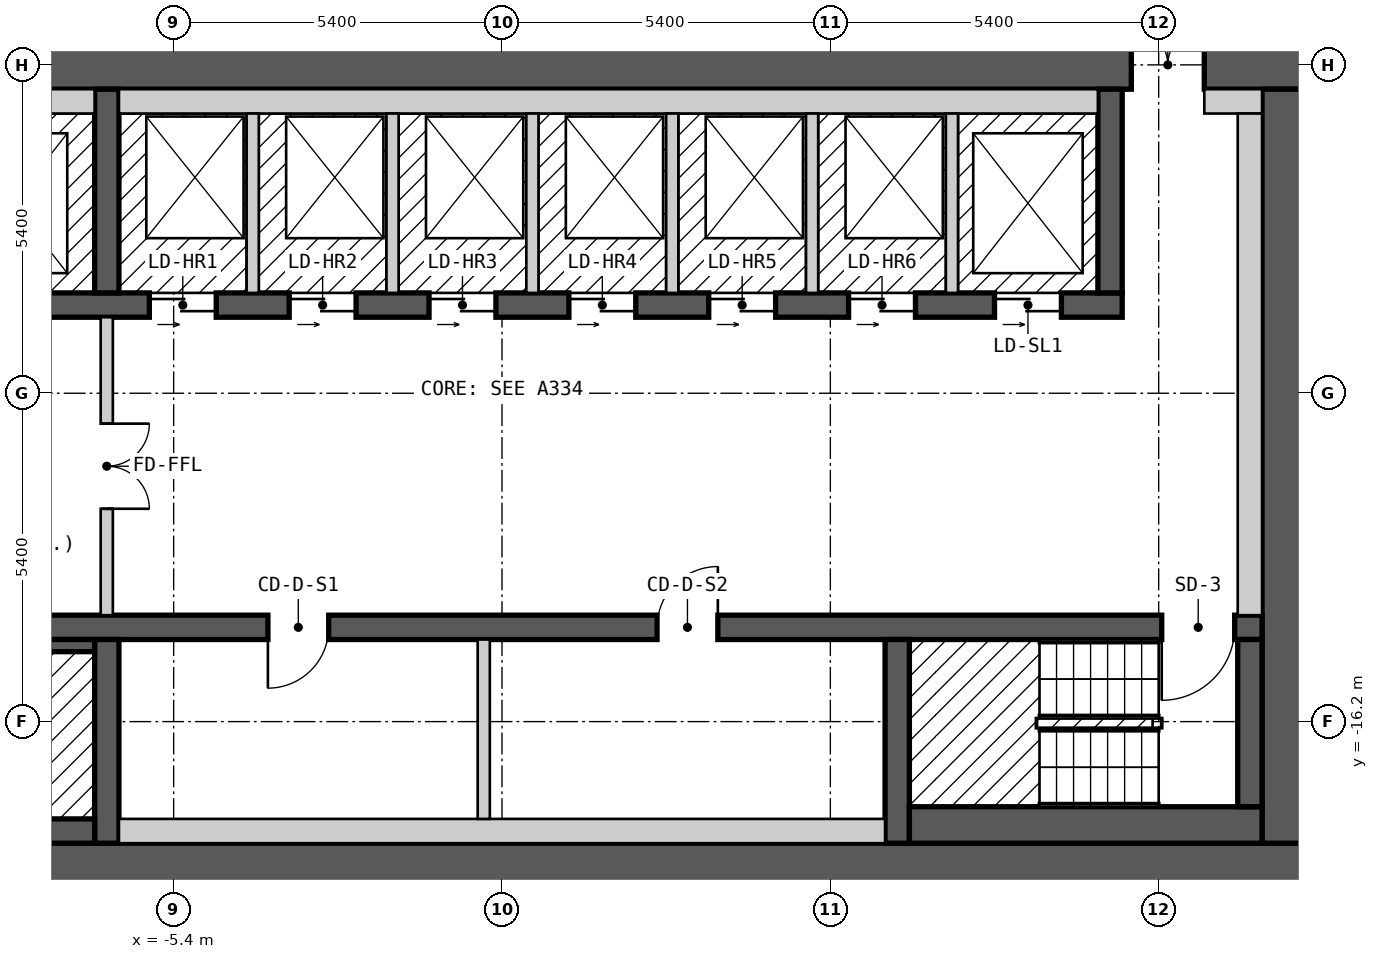
"""IFC4 building model, lengths in metres.
Left out: names, types, materials, properties, quantities, classifications, styles, units other than length and angle.
Written with IfcOpenShell. Run it as: python <this file> out.ifc"""

import sys

from ifc_helpers import new_model, si_unit, direction, frame, frame_2d, origin, place, context, subcontext, project, spatial, rectangle, extrude, element, fill, save


model = new_model("IFC4")
c1 = context("Model", 3, precision=1e-05, world=origin(), true_north=direction((0.0, 1.0)))
c2 = subcontext(c1, "Body", "Model", "MODEL_VIEW")
j1 = project(units=[si_unit("LENGTHUNIT", "METRE"), si_unit("PLANEANGLEUNIT", "RADIAN")], contexts=[c1])
p1 = place(None, origin())
s1 = spatial("IfcSite", under=j1, at=p1, CompositionType="ELEMENT")
p2 = place(p1, origin())
s2 = spatial("IfcBuilding", under=s1, at=p2, CompositionType="ELEMENT")
p3 = place(p2, frame((0.0, 0.0, 120.6)))
s3 = spatial("IfcBuildingStorey", under=s2, at=p3, CompositionType="ELEMENT", Elevation=120.6)
p4 = place(p3, frame((-13.3, -18.6, 0.0), z_axis=(0.0, 0.0, 1.0), x_axis=(1.0, 0.0, 0.0)))
e1 = element("IfcWall", 1, at=p4, inside=s3, PredefinedType="SHEAR", context=c2, shape_type="SweptSolid", body=[
    extrude(rectangle(XDim=26.6, YDim=0.8, at=frame_2d((13.3, 0.0))), origin(), (0.0, 0.0, 1.0), 2.7),
])
p5 = place(p3, frame((-13.3, -5.4, 0.0), z_axis=(0.0, 0.0, 1.0), x_axis=(1.0, 0.0, 0.0)))
e2 = element("IfcWall", 2, at=p5, inside=s3, PredefinedType="SHEAR", context=c2, shape_type="SweptSolid", body=[
    extrude(rectangle(XDim=26.6, YDim=0.8, at=frame_2d((13.3, 0.0))), origin(), (0.0, 0.0, 1.0), 2.7),
])
p6 = place(p5, frame((23.65, 0.0, 0.0)))
e3 = element("IfcOpeningElement", 3, at=p6, cuts=e2, PredefinedType="OPENING", context=c2, shape_type="SweptSolid", body=[
    extrude(rectangle(XDim=1.2, YDim=2.1, at=frame_2d((0.6, 1.05))), frame((0.0, 0.41, 0.0), z_axis=(0.0, -1.0, 0.0), x_axis=(1.0, 0.0, 0.0)), (0.0, 0.0, 1.0), 0.82),
])
p7 = place(p3, frame((12.9, -18.2, 0.0), z_axis=(0.0, 0.0, 1.0), x_axis=(0.0, 1.0, 0.0)))
e4 = element("IfcWall", 4, at=p7, inside=s3, PredefinedType="SHEAR", context=c2, shape_type="SweptSolid", body=[
    extrude(rectangle(XDim=12.4, YDim=0.8, at=frame_2d((6.2, 0.0))), origin(), (0.0, 0.0, 1.0), 2.7),
])
p8 = place(p3, frame((-12.5, -14.65, 0.0), z_axis=(0.0, 0.0, 1.0), x_axis=(1.0, 0.0, 0.0)))
e5 = element("IfcWall", 5, at=p8, inside=s3, PredefinedType="SHEAR", context=c2, shape_type="SweptSolid", body=[
    extrude(rectangle(XDim=25.0, YDim=0.4, at=frame_2d((12.5, 0.0))), origin(), (0.0, 0.0, 1.0), 2.7),
])
p9 = place(p8, frame((1.7, 0.0, 0.0), z_axis=(0.0, 0.0, 1.0), x_axis=(-1.0, 0.0, 0.0)))
e6 = element("IfcOpeningElement", 6, at=p9, cuts=e5, PredefinedType="OPENING", context=c2, shape_type="SweptSolid", body=[
    extrude(rectangle(XDim=1.2, YDim=2.1, at=frame_2d((0.6, 1.05))), frame((0.0, 0.21, 0.0), z_axis=(0.0, -1.0, 0.0), x_axis=(1.0, 0.0, 0.0)), (0.0, 0.0, 1.0), 0.42),
])
p10 = place(p8, frame((24.55, 0.0, 0.0), z_axis=(0.0, 0.0, 1.0), x_axis=(-1.0, 0.0, 0.0)))
e7 = element("IfcOpeningElement", 7, at=p10, cuts=e5, PredefinedType="OPENING", context=c2, shape_type="SweptSolid", body=[
    extrude(rectangle(XDim=1.2, YDim=2.1, at=frame_2d((0.6, 1.05))), frame((0.0, 0.21, 0.0), z_axis=(0.0, -1.0, 0.0), x_axis=(1.0, 0.0, 0.0)), (0.0, 0.0, 1.0), 0.42),
])
p11 = place(p8, frame((9.65, 0.0, 0.0), z_axis=(0.0, 0.0, 1.0), x_axis=(-1.0, 0.0, 0.0)))
e8 = element("IfcOpeningElement", 8, at=p11, cuts=e5, PredefinedType="OPENING", context=c2, shape_type="SweptSolid", body=[
    extrude(rectangle(XDim=1.0, YDim=2.1, at=frame_2d((0.5, 1.05))), frame((0.0, 0.21, 0.0), z_axis=(0.0, -1.0, 0.0), x_axis=(1.0, 0.0, 0.0)), (0.0, 0.0, 1.0), 0.42),
])
p12 = place(p8, frame((16.05, 0.0, 0.0), z_axis=(0.0, 0.0, 1.0), x_axis=(-1.0, 0.0, 0.0)))
e9 = element("IfcOpeningElement", 9, at=p12, cuts=e5, PredefinedType="OPENING", context=c2, shape_type="SweptSolid", body=[
    extrude(rectangle(XDim=1.0, YDim=2.1, at=frame_2d((0.5, 1.05))), frame((0.0, 0.21, 0.0), z_axis=(0.0, -1.0, 0.0), x_axis=(1.0, 0.0, 0.0)), (0.0, 0.0, 1.0), 0.42),
])
p13 = place(p3, frame((-12.5, -9.35, 0.0), z_axis=(0.0, 0.0, 1.0), x_axis=(1.0, 0.0, 0.0)))
e10 = element("IfcWall", 10, at=p13, inside=s3, PredefinedType="SHEAR", context=c2, shape_type="SweptSolid", body=[
    extrude(rectangle(XDim=22.7, YDim=0.4, at=frame_2d((11.35, 0.0))), origin(), (0.0, 0.0, 1.0), 2.7),
])
p14 = place(p13, frame((1.1, 0.0, 0.0)))
e11 = element("IfcOpeningElement", 11, at=p14, cuts=e10, PredefinedType="OPENING", context=c2, shape_type="SweptSolid", body=[
    extrude(rectangle(XDim=1.1, YDim=2.1, at=frame_2d((0.55, 1.05))), frame((0.0, 0.21, 0.0), z_axis=(0.0, -1.0, 0.0), x_axis=(1.0, 0.0, 0.0)), (0.0, 0.0, 1.0), 0.42),
])
p15 = place(p13, frame((3.9, 0.0, 0.0)))
e12 = element("IfcOpeningElement", 12, at=p15, cuts=e10, PredefinedType="OPENING", context=c2, shape_type="SweptSolid", body=[
    extrude(rectangle(XDim=1.1, YDim=2.1, at=frame_2d((0.55, 1.05))), frame((0.0, 0.21, 0.0), z_axis=(0.0, -1.0, 0.0), x_axis=(1.0, 0.0, 0.0)), (0.0, 0.0, 1.0), 0.42),
])
p16 = place(p13, frame((6.7, 0.0, 0.0)))
e13 = element("IfcOpeningElement", 13, at=p16, cuts=e10, PredefinedType="OPENING", context=c2, shape_type="SweptSolid", body=[
    extrude(rectangle(XDim=1.1, YDim=2.1, at=frame_2d((0.55, 1.05))), frame((0.0, 0.21, 0.0), z_axis=(0.0, -1.0, 0.0), x_axis=(1.0, 0.0, 0.0)), (0.0, 0.0, 1.0), 0.42),
])
p17 = place(p13, frame((9.0, 0.0, 0.0)))
e14 = element("IfcOpeningElement", 14, at=p17, cuts=e10, PredefinedType="OPENING", context=c2, shape_type="SweptSolid", body=[
    extrude(rectangle(XDim=1.1, YDim=2.1, at=frame_2d((0.55, 1.05))), frame((0.0, 0.21, 0.0), z_axis=(0.0, -1.0, 0.0), x_axis=(1.0, 0.0, 0.0)), (0.0, 0.0, 1.0), 0.42),
])
p18 = place(p13, frame((11.3, 0.0, 0.0)))
e15 = element("IfcOpeningElement", 15, at=p18, cuts=e10, PredefinedType="OPENING", context=c2, shape_type="SweptSolid", body=[
    extrude(rectangle(XDim=1.1, YDim=2.1, at=frame_2d((0.55, 1.05))), frame((0.0, 0.21, 0.0), z_axis=(0.0, -1.0, 0.0), x_axis=(1.0, 0.0, 0.0)), (0.0, 0.0, 1.0), 0.42),
])
p19 = place(p13, frame((13.6, 0.0, 0.0)))
e16 = element("IfcOpeningElement", 16, at=p19, cuts=e10, PredefinedType="OPENING", context=c2, shape_type="SweptSolid", body=[
    extrude(rectangle(XDim=1.1, YDim=2.1, at=frame_2d((0.55, 1.05))), frame((0.0, 0.21, 0.0), z_axis=(0.0, -1.0, 0.0), x_axis=(1.0, 0.0, 0.0)), (0.0, 0.0, 1.0), 0.42),
])
p20 = place(p13, frame((15.9, 0.0, 0.0)))
e17 = element("IfcOpeningElement", 17, at=p20, cuts=e10, PredefinedType="OPENING", context=c2, shape_type="SweptSolid", body=[
    extrude(rectangle(XDim=1.1, YDim=2.1, at=frame_2d((0.55, 1.05))), frame((0.0, 0.21, 0.0), z_axis=(0.0, -1.0, 0.0), x_axis=(1.0, 0.0, 0.0)), (0.0, 0.0, 1.0), 0.42),
])
p21 = place(p13, frame((18.2, 0.0, 0.0)))
e18 = element("IfcOpeningElement", 18, at=p21, cuts=e10, PredefinedType="OPENING", context=c2, shape_type="SweptSolid", body=[
    extrude(rectangle(XDim=1.1, YDim=2.1, at=frame_2d((0.55, 1.05))), frame((0.0, 0.21, 0.0), z_axis=(0.0, -1.0, 0.0), x_axis=(1.0, 0.0, 0.0)), (0.0, 0.0, 1.0), 0.42),
])
p22 = place(p13, frame((20.6, 0.0, 0.0)))
e19 = element("IfcOpeningElement", 19, at=p22, cuts=e10, PredefinedType="OPENING", context=c2, shape_type="SweptSolid", body=[
    extrude(rectangle(XDim=1.1, YDim=2.1, at=frame_2d((0.55, 1.05))), frame((0.0, 0.21, 0.0), z_axis=(0.0, -1.0, 0.0), x_axis=(1.0, 0.0, 0.0)), (0.0, 0.0, 1.0), 0.42),
])
for number, where, z_axis, x_axis in (
    (20, (-6.5, -18.2, 0.0), (0.0, 0.0, 1.0), (0.0, 1.0, 0.0)),
    (21, (6.5, -18.2, 0.0), (0.0, 0.0, 1.0), (0.0, 1.0, 0.0)),
    (22, (-6.5, -9.15, 0.0), (0.0, 0.0, 1.0), (0.0, 1.0, 0.0)),
    (23, (10.0, -9.15, 0.0), (0.0, 0.0, 1.0), (0.0, 1.0, 0.0)),
):
    element("IfcWall", number, at=place(p3, frame(where, z_axis=z_axis, x_axis=x_axis)), inside=s3, PredefinedType="SHEAR", context=c2, shape_type="SweptSolid", body=[
        extrude(rectangle(XDim=3.35, YDim=0.4, at=frame_2d((1.675, 0.0))), origin(), (0.0, 0.0, 1.0), 2.7),
    ])
for number, where, z_axis, x_axis in (
    (24, (-12.1, -18.0, 0.0), (0.0, 0.0, 1.0), (1.0, 0.0, 0.0)),
    (25, (-12.1, -6.0, 0.0), (0.0, 0.0, 1.0), (1.0, 0.0, 0.0)),
):
    element("IfcWall", number, at=place(p3, frame(where, z_axis=z_axis, x_axis=x_axis)), inside=s3, PredefinedType="SOLIDWALL", context=c2, shape_type="SweptSolid", body=[
        extrude(rectangle(XDim=5.4, YDim=0.4, at=frame_2d((2.7, 0.0))), origin(), (0.0, 0.0, 1.0), 2.7),
    ])
p23 = place(p3, frame((-10.8, -14.95, 0.0), z_axis=(0.0, 0.0, 1.0), x_axis=(1.0, 0.0, 0.0)))
e26 = element("IfcWall", 26, at=p23, inside=s3, PredefinedType="SOLIDWALL", context=c2, shape_type="SweptSolid", body=[
    extrude(rectangle(XDim=4.1, YDim=0.2, at=frame_2d((2.05, 0.0))), origin(), (0.0, 0.0, 1.0), 2.7),
])
p24 = place(p3, frame((-6.5, -14.45, 0.0), z_axis=(0.0, 0.0, 1.0), x_axis=(0.0, 1.0, 0.0)))
e27 = element("IfcWall", 27, at=p24, inside=s3, PredefinedType="PARTITIONING", context=c2, shape_type="SweptSolid", body=[
    extrude(rectangle(XDim=4.9, YDim=0.2, at=frame_2d((2.45, 0.0))), origin(), (0.0, 0.0, 1.0), 2.7),
])
p25 = place(p24, frame((3.15, 0.0, 0.0), z_axis=(0.0, 0.0, 1.0), x_axis=(-1.0, 0.0, 0.0)))
e28 = element("IfcOpeningElement", 28, at=p25, cuts=e27, PredefinedType="OPENING", context=c2, shape_type="SweptSolid", body=[
    extrude(rectangle(XDim=1.4, YDim=2.1, at=frame_2d((0.7, 1.05))), frame((0.0, 0.11, 0.0), z_axis=(0.0, -1.0, 0.0), x_axis=(1.0, 0.0, 0.0)), (0.0, 0.0, 1.0), 0.22),
])
p26 = place(p3, frame((-6.3, -18.0, 0.0), z_axis=(0.0, 0.0, 1.0), x_axis=(1.0, 0.0, 0.0)))
e29 = element("IfcWall", 29, at=p26, inside=s3, PredefinedType="PARTITIONING", context=c2, shape_type="SweptSolid", body=[
    extrude(rectangle(XDim=12.6, YDim=0.4, at=frame_2d((6.3, 0.0))), origin(), (0.0, 0.0, 1.0), 2.7),
])
p27 = place(p3, frame((-6.3, -6.0, 0.0), z_axis=(0.0, 0.0, 1.0), x_axis=(1.0, 0.0, 0.0)))
e30 = element("IfcWall", 30, at=p27, inside=s3, PredefinedType="SOLIDWALL", context=c2, shape_type="SweptSolid", body=[
    extrude(rectangle(XDim=16.1, YDim=0.4, at=frame_2d((8.05, 0.0))), origin(), (0.0, 0.0, 1.0), 2.7),
])
for number, where, z_axis, x_axis in (
    (31, (-4.1, -9.15, 0.0), (0.0, 0.0, 1.0), (0.0, 1.0, 0.0)),
    (32, (-1.8, -9.15, 0.0), (0.0, 0.0, 1.0), (0.0, 1.0, 0.0)),
):
    element("IfcWall", number, at=place(p3, frame(where, z_axis=z_axis, x_axis=x_axis)), inside=s3, PredefinedType="SOLIDWALL", context=c2, shape_type="SweptSolid", body=[
        extrude(rectangle(XDim=2.95, YDim=0.2, at=frame_2d((1.475, 0.0))), origin(), (0.0, 0.0, 1.0), 2.7),
    ])
p28 = place(p3, frame((-0.3, -17.8, 0.0), z_axis=(0.0, 0.0, 1.0), x_axis=(0.0, 1.0, 0.0)))
e33 = element("IfcWall", 33, at=p28, inside=s3, PredefinedType="PARTITIONING", context=c2, shape_type="SweptSolid", body=[
    extrude(rectangle(XDim=2.95, YDim=0.2, at=frame_2d((1.475, 0.0))), origin(), (0.0, 0.0, 1.0), 2.7),
])
for number, where, z_axis, x_axis in (
    (34, (0.5, -9.15, 0.0), (0.0, 0.0, 1.0), (0.0, 1.0, 0.0)),
    (35, (2.8, -9.15, 0.0), (0.0, 0.0, 1.0), (0.0, 1.0, 0.0)),
    (36, (5.1, -9.15, 0.0), (0.0, 0.0, 1.0), (0.0, 1.0, 0.0)),
):
    element("IfcWall", number, at=place(p3, frame(where, z_axis=z_axis, x_axis=x_axis)), inside=s3, PredefinedType="SOLIDWALL", context=c2, shape_type="SweptSolid", body=[
        extrude(rectangle(XDim=2.95, YDim=0.2, at=frame_2d((1.475, 0.0))), origin(), (0.0, 0.0, 1.0), 2.7),
    ])
p29 = place(p3, frame((6.7, -17.9, 0.0), z_axis=(0.0, 0.0, 1.0), x_axis=(1.0, 0.0, 0.0)))
e37 = element("IfcWall", 37, at=p29, inside=s3, PredefinedType="SOLIDWALL", context=c2, shape_type="SweptSolid", body=[
    extrude(rectangle(XDim=5.8, YDim=0.6, at=frame_2d((2.9, 0.0))), origin(), (0.0, 0.0, 1.0), 2.7),
])
p30 = place(p3, frame((7.4, -9.15, 0.0), z_axis=(0.0, 0.0, 1.0), x_axis=(0.0, 1.0, 0.0)))
e38 = element("IfcWall", 38, at=p30, inside=s3, PredefinedType="SOLIDWALL", context=c2, shape_type="SweptSolid", body=[
    extrude(rectangle(XDim=2.95, YDim=0.2, at=frame_2d((1.475, 0.0))), origin(), (0.0, 0.0, 1.0), 2.7),
])
p31 = place(p3, frame((11.55, -6.0, 0.0), z_axis=(0.0, 0.0, 1.0), x_axis=(1.0, 0.0, 0.0)))
e39 = element("IfcWall", 39, at=p31, inside=s3, PredefinedType="PARTITIONING", context=c2, shape_type="SweptSolid", body=[
    extrude(rectangle(XDim=0.95, YDim=0.4, at=frame_2d((0.475, 0.0))), origin(), (0.0, 0.0, 1.0), 2.7),
])
p32 = place(p3, frame((12.3, -17.6, 0.0), z_axis=(0.0, 0.0, 1.0), x_axis=(0.0, 1.0, 0.0)))
e40 = element("IfcWall", 40, at=p32, inside=s3, PredefinedType="SOLIDWALL", context=c2, shape_type="SweptSolid", body=[
    extrude(rectangle(XDim=2.75, YDim=0.4, at=frame_2d((1.375, 0.0))), origin(), (0.0, 0.0, 1.0), 2.7),
])
p33 = place(p3, frame((12.3, -14.45, 0.0), z_axis=(0.0, 0.0, 1.0), x_axis=(0.0, 1.0, 0.0)))
e41 = element("IfcWall", 41, at=p33, inside=s3, PredefinedType="PARTITIONING", context=c2, shape_type="SweptSolid", body=[
    extrude(rectangle(XDim=8.25, YDim=0.4, at=frame_2d((4.125, 0.0))), origin(), (0.0, 0.0, 1.0), 2.7),
])
p34 = place(p16, origin())
e42 = element("IfcDoor", 42, at=p34, inside=s3, OperationType="DOUBLE_DOOR_SLIDING", PredefinedType="DOOR", context=c2, shape_type="SweptSolid", body=[
    extrude(rectangle(XDim=1.1, YDim=2.1, at=frame_2d((0.55, 1.05))), frame((0.0, 0.025, 0.0), z_axis=(0.0, -1.0, 0.0), x_axis=(1.0, 0.0, 0.0)), (0.0, 0.0, 1.0), 0.05),
])
fill(e13, e42)
p35 = place(p17, origin())
e43 = element("IfcDoor", 43, at=p35, inside=s3, OperationType="DOUBLE_DOOR_SLIDING", PredefinedType="DOOR", context=c2, shape_type="SweptSolid", body=[
    extrude(rectangle(XDim=1.1, YDim=2.1, at=frame_2d((0.55, 1.05))), frame((0.0, 0.025, 0.0), z_axis=(0.0, -1.0, 0.0), x_axis=(1.0, 0.0, 0.0)), (0.0, 0.0, 1.0), 0.05),
])
fill(e14, e43)
p36 = place(p18, origin())
e44 = element("IfcDoor", 44, at=p36, inside=s3, OperationType="DOUBLE_DOOR_SLIDING", PredefinedType="DOOR", context=c2, shape_type="SweptSolid", body=[
    extrude(rectangle(XDim=1.1, YDim=2.1, at=frame_2d((0.55, 1.05))), frame((0.0, 0.025, 0.0), z_axis=(0.0, -1.0, 0.0), x_axis=(1.0, 0.0, 0.0)), (0.0, 0.0, 1.0), 0.05),
])
fill(e15, e44)
p37 = place(p19, origin())
e45 = element("IfcDoor", 45, at=p37, inside=s3, OperationType="DOUBLE_DOOR_SLIDING", PredefinedType="DOOR", context=c2, shape_type="SweptSolid", body=[
    extrude(rectangle(XDim=1.1, YDim=2.1, at=frame_2d((0.55, 1.05))), frame((0.0, 0.025, 0.0), z_axis=(0.0, -1.0, 0.0), x_axis=(1.0, 0.0, 0.0)), (0.0, 0.0, 1.0), 0.05),
])
fill(e16, e45)
p38 = place(p20, origin())
e46 = element("IfcDoor", 46, at=p38, inside=s3, OperationType="DOUBLE_DOOR_SLIDING", PredefinedType="DOOR", context=c2, shape_type="SweptSolid", body=[
    extrude(rectangle(XDim=1.1, YDim=2.1, at=frame_2d((0.55, 1.05))), frame((0.0, 0.025, 0.0), z_axis=(0.0, -1.0, 0.0), x_axis=(1.0, 0.0, 0.0)), (0.0, 0.0, 1.0), 0.05),
])
fill(e17, e46)
p39 = place(p21, origin())
e47 = element("IfcDoor", 47, at=p39, inside=s3, OperationType="DOUBLE_DOOR_SLIDING", PredefinedType="DOOR", context=c2, shape_type="SweptSolid", body=[
    extrude(rectangle(XDim=1.1, YDim=2.1, at=frame_2d((0.55, 1.05))), frame((0.0, 0.025, 0.0), z_axis=(0.0, -1.0, 0.0), x_axis=(1.0, 0.0, 0.0)), (0.0, 0.0, 1.0), 0.05),
])
fill(e18, e47)
p40 = place(p22, origin())
e48 = element("IfcDoor", 48, at=p40, inside=s3, OperationType="DOUBLE_DOOR_SLIDING", PredefinedType="DOOR", context=c2, shape_type="SweptSolid", body=[
    extrude(rectangle(XDim=1.1, YDim=2.1, at=frame_2d((0.55, 1.05))), frame((0.0, 0.025, 0.0), z_axis=(0.0, -1.0, 0.0), x_axis=(1.0, 0.0, 0.0)), (0.0, 0.0, 1.0), 0.05),
])
fill(e19, e48)
p41 = place(p10, origin())
e49 = element("IfcDoor", 49, at=p41, inside=s3, OperationType="SINGLE_SWING_RIGHT", PredefinedType="DOOR", context=c2, shape_type="SweptSolid", body=[
    extrude(rectangle(XDim=1.2, YDim=2.1, at=frame_2d((0.6, 1.05))), frame((0.0, 0.025, 0.0), z_axis=(0.0, -1.0, 0.0), x_axis=(1.0, 0.0, 0.0)), (0.0, 0.0, 1.0), 0.05),
])
fill(e7, e49)
p42 = place(p25, origin())
e50 = element("IfcDoor", 50, at=p42, inside=s3, OperationType="DOUBLE_DOOR_SINGLE_SWING", PredefinedType="DOOR", context=c2, shape_type="SweptSolid", body=[
    extrude(rectangle(XDim=1.4, YDim=2.1, at=frame_2d((0.7, 1.05))), frame((0.0, 0.025, 0.0), z_axis=(0.0, -1.0, 0.0), x_axis=(1.0, 0.0, 0.0)), (0.0, 0.0, 1.0), 0.05),
])
fill(e28, e50)
p43 = place(p6, origin())
e51 = element("IfcDoor", 51, at=p43, inside=s3, OperationType="DOUBLE_DOOR_SINGLE_SWING", PredefinedType="DOOR", context=c2, shape_type="SweptSolid", body=[
    extrude(rectangle(XDim=1.2, YDim=2.1, at=frame_2d((0.6, 1.05))), frame((0.0, 0.025, 0.0), z_axis=(0.0, -1.0, 0.0), x_axis=(1.0, 0.0, 0.0)), (0.0, 0.0, 1.0), 0.05),
])
fill(e3, e51)
p44 = place(p11, origin())
e52 = element("IfcDoor", 52, at=p44, inside=s3, OperationType="SINGLE_SWING_RIGHT", PredefinedType="DOOR", context=c2, shape_type="SweptSolid", body=[
    extrude(rectangle(XDim=1.0, YDim=2.1, at=frame_2d((0.5, 1.05))), frame((0.0, 0.025, 0.0), z_axis=(0.0, -1.0, 0.0), x_axis=(1.0, 0.0, 0.0)), (0.0, 0.0, 1.0), 0.05),
])
fill(e8, e52)
p45 = place(p12, origin())
e53 = element("IfcDoor", 53, at=p45, inside=s3, OperationType="SINGLE_SWING_LEFT", PredefinedType="DOOR", context=c2, shape_type="SweptSolid", body=[
    extrude(rectangle(XDim=1.0, YDim=2.1, at=frame_2d((0.5, 1.05))), frame((0.0, 0.025, 0.0), z_axis=(0.0, -1.0, 0.0), x_axis=(1.0, 0.0, 0.0)), (0.0, 0.0, 1.0), 0.05),
])
fill(e9, e53)
save(model, sys.argv[1])
